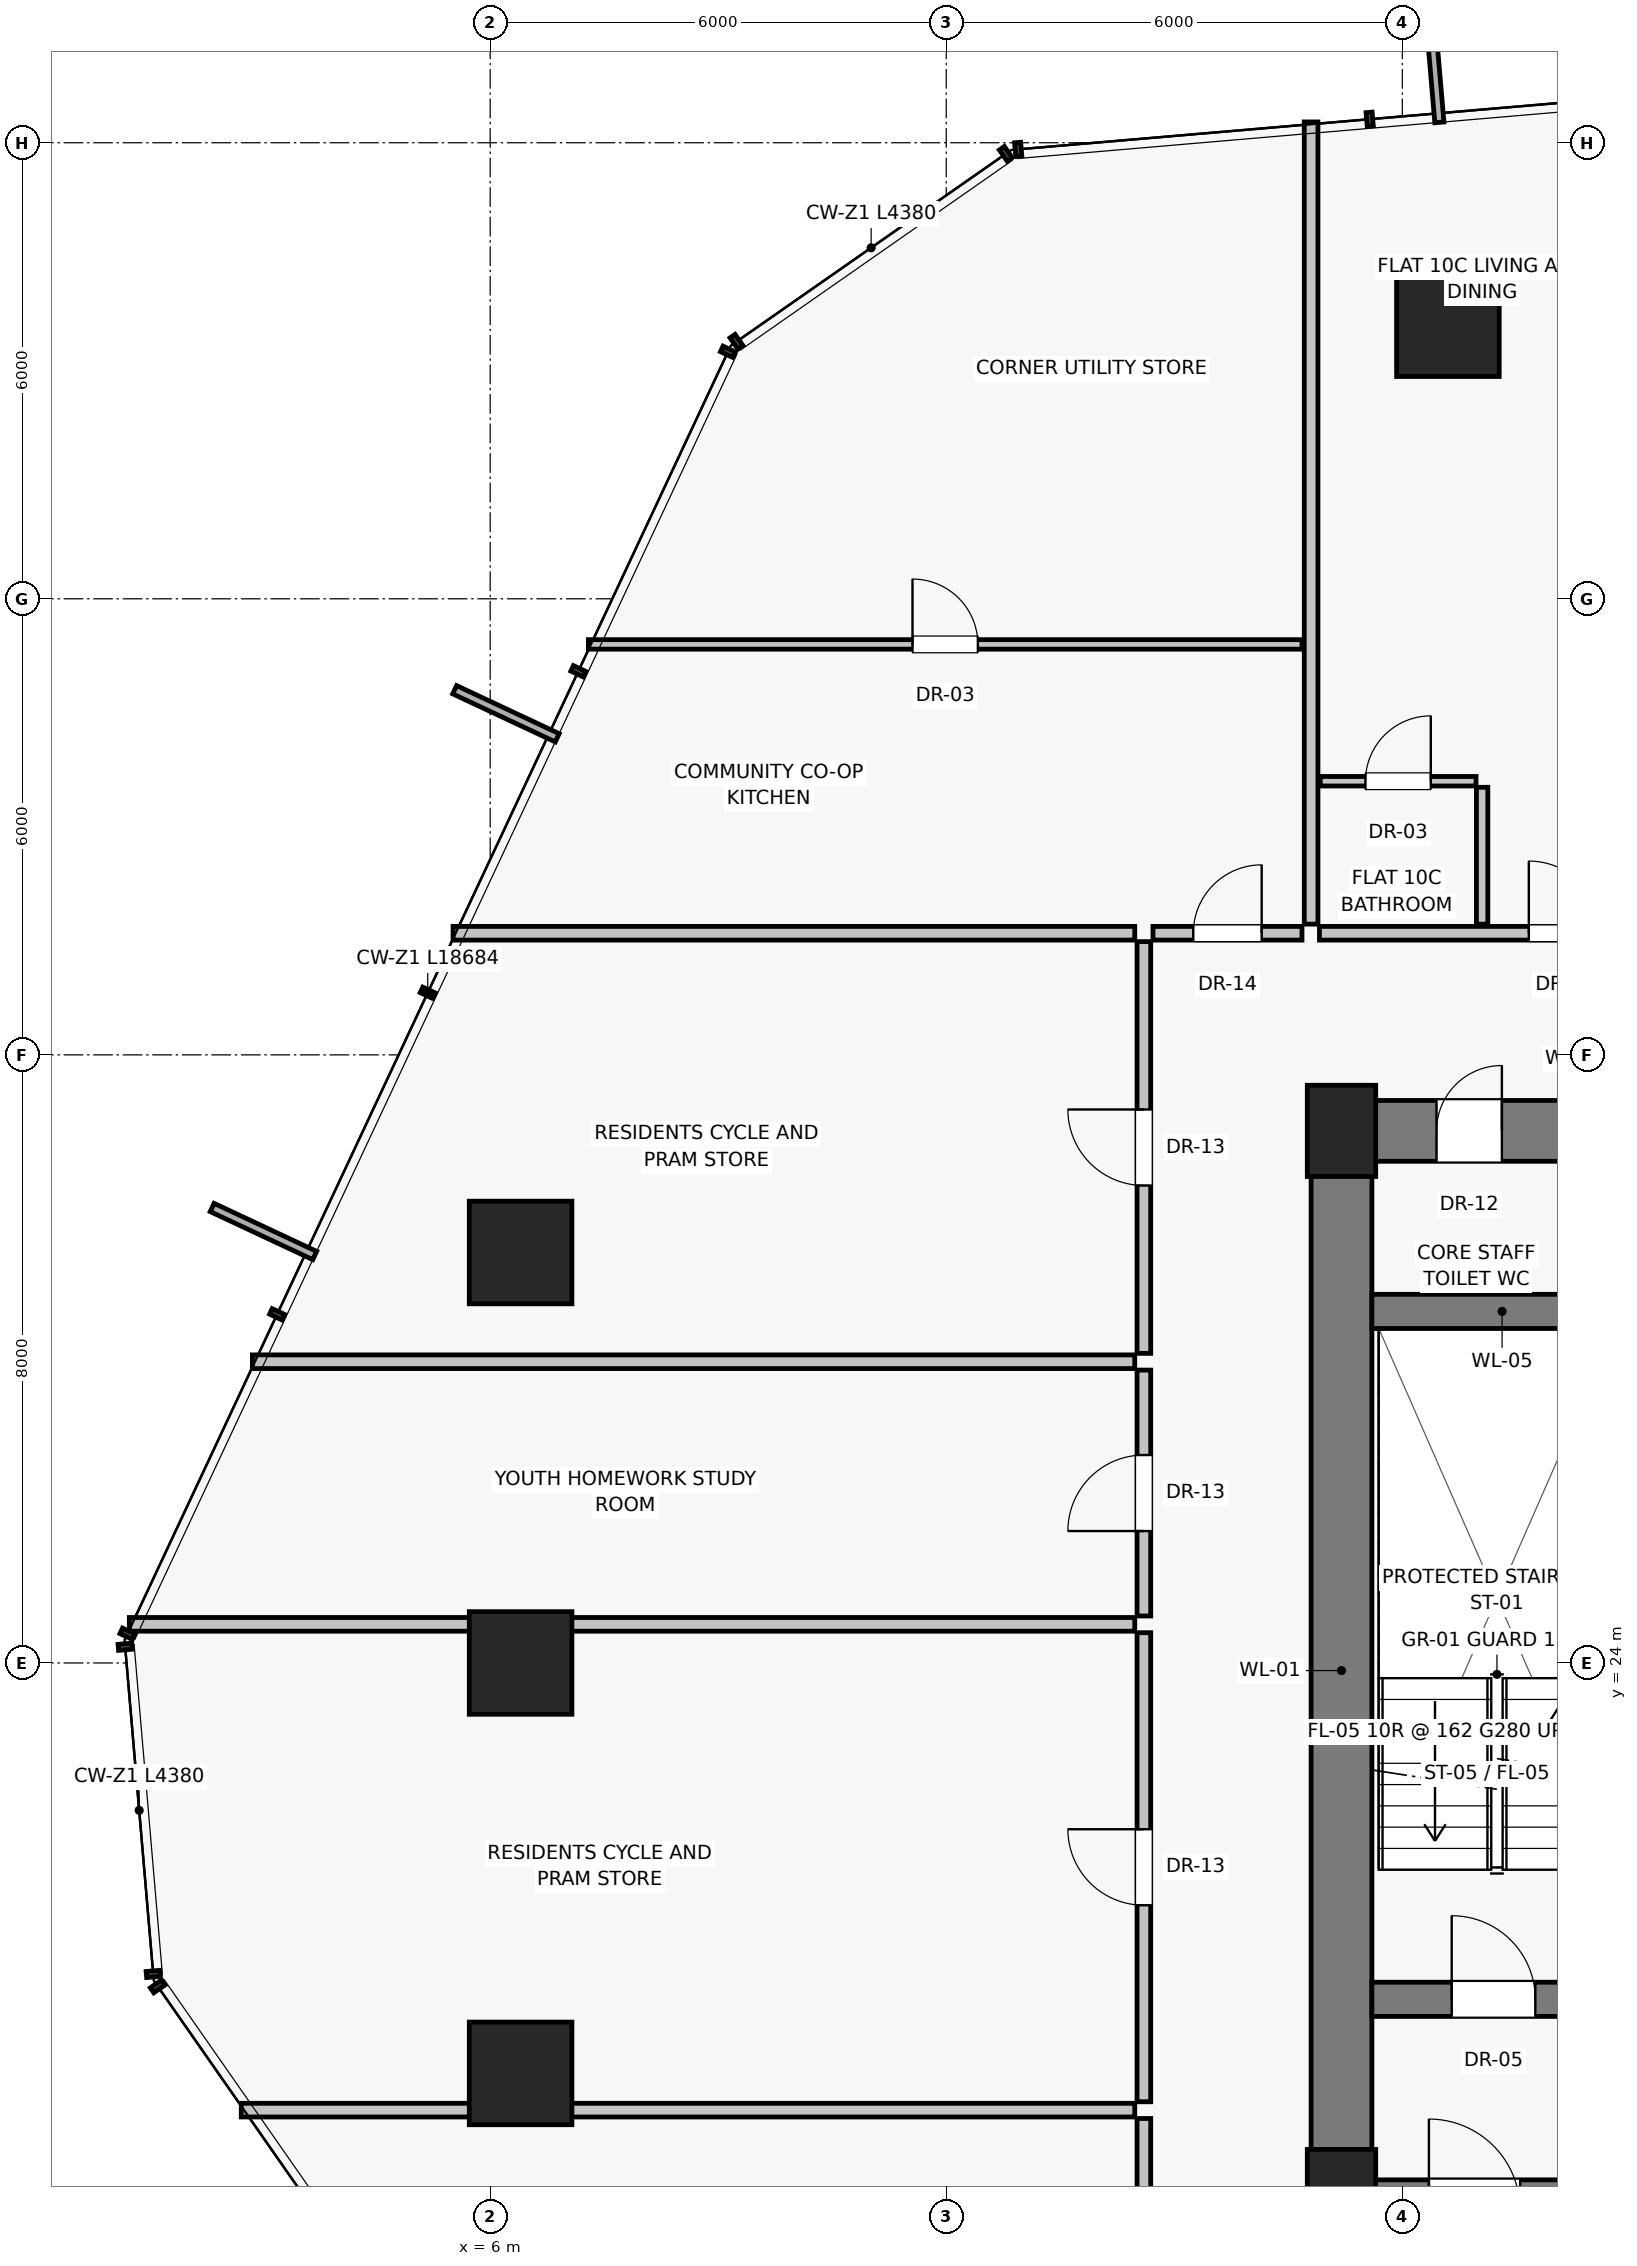
"""IFC4 building model, lengths in metres.
Left out: names, types, materials, properties, quantities, classifications, styles, units other than length and angle.
Written with IfcOpenShell. Run it as: python <this file> out.ifc"""

import sys

from ifc_helpers import new_model, si_unit, direction, frame, frame_2d, origin, origin_2d, place, context, subcontext, project, spatial, rectangle, extrude, source, transform, mapped, element, fill, save


model = new_model("IFC4")
c1 = context("Model", 3, precision=1e-05, world=origin(), true_north=direction((0.0, 1.0)))
c2 = subcontext(c1, "Body", "Model", "MODEL_VIEW")
j1 = project(units=[si_unit("LENGTHUNIT", "METRE"), si_unit("PLANEANGLEUNIT", "RADIAN")], contexts=[c1])
p1 = place(None, origin())
s1 = spatial("IfcSite", under=j1, at=p1, CompositionType="ELEMENT")
p2 = place(p1, origin())
s2 = spatial("IfcBuilding", under=s1, at=p2, CompositionType="ELEMENT")
p3 = place(p2, frame((0.0, 0.0, 40.3)))
s3 = spatial("IfcBuildingStorey", under=s2, at=p3, CompositionType="ELEMENT", Elevation=40.3)
for number, where, z_axis, x_axis in (
    (1, (17.2, 17.0, 0.0), (0.0, 0.0, 1.0), (1.0, 0.0, 0.0)),
    (2, (17.2, 31.0, 0.0), (0.0, 0.0, 1.0), (1.0, 0.0, 0.0)),
):
    element("IfcColumn", number, at=place(p3, frame(where, z_axis=z_axis, x_axis=x_axis)), inside=s3, PredefinedType="PILASTER", context=c2, shape_type="SweptSolid", body=[
        extrude(rectangle(XDim=0.9, YDim=1.2, at=origin_2d()), origin(), (0.0, 0.0, 1.0), 3.25),
    ])
for number, where, z_axis, x_axis in (
    (3, (18.6, 41.6, 0.0), (0.0, 0.0, 1.0), (1.0, 0.0, 0.0)),
    (4, (6.4, 29.4, 0.0), (0.0, 0.0, 1.0), (1.0, 0.0, 0.0)),
    (5, (6.4, 24.0, 0.0), (0.0, 0.0, 1.0), (1.0, 0.0, 0.0)),
    (6, (6.4, 18.6, 0.0), (0.0, 0.0, 1.0), (1.0, 0.0, 0.0)),
):
    element("IfcColumn", number, at=place(p3, frame(where, z_axis=z_axis, x_axis=x_axis)), inside=s3, PredefinedType="COLUMN", context=c2, shape_type="SweptSolid", body=[
        extrude(rectangle(XDim=1.35, YDim=1.35, at=origin_2d()), origin(), (0.0, 0.0, 1.0), 3.25),
    ])
p4 = place(p3, frame((17.2, 16.8, 0.0), z_axis=(0.0, 0.0, 1.0), x_axis=(0.0, 1.0, 0.0)))
e7 = element("IfcWall", 7, at=p4, inside=s3, PredefinedType="SHEAR", context=c2, shape_type="SweptSolid", body=[
    extrude(rectangle(XDim=14.2, YDim=0.8, at=frame_2d((7.1, 0.0))), origin(), (0.0, 0.0, 1.0), 3.0),
])
p5 = place(p3, frame((17.2, 16.8, 0.0), z_axis=(0.0, 0.0, 1.0), x_axis=(1.0, 0.0, 0.0)))
e8 = element("IfcWall", 8, at=p5, inside=s3, PredefinedType="SHEAR", context=c2, shape_type="SweptSolid", body=[
    extrude(rectangle(XDim=5.85, YDim=0.8, at=frame_2d((2.925, 0.0))), origin(), (0.0, 0.0, 1.0), 3.0),
])
p6 = place(p5, frame((1.15, 0.0, 0.0)))
e9 = element("IfcOpeningElement", 9, at=p6, cuts=e8, PredefinedType="OPENING", context=c2, shape_type="SweptSolid", body=[
    extrude(rectangle(XDim=1.2, YDim=2.03, at=frame_2d((0.6, 1.015))), frame((0.0, 0.41, 0.0), z_axis=(0.0, -1.0, 0.0), x_axis=(1.0, 0.0, 0.0)), (0.0, 0.0, 1.0), 0.82),
])
p7 = place(p3, frame((17.2, 31.0, 0.0), z_axis=(0.0, 0.0, 1.0), x_axis=(1.0, 0.0, 0.0)))
e10 = element("IfcWall", 10, at=p7, inside=s3, PredefinedType="SHEAR", context=c2, shape_type="SweptSolid", body=[
    extrude(rectangle(XDim=3.8, YDim=0.8, at=frame_2d((1.9, 0.0))), origin(), (0.0, 0.0, 1.0), 3.0),
])
p8 = place(p7, frame((1.25, 0.0, 0.0)))
e11 = element("IfcOpeningElement", 11, at=p8, cuts=e10, PredefinedType="OPENING", context=c2, shape_type="SweptSolid", body=[
    extrude(rectangle(XDim=0.86, YDim=2.01, at=frame_2d((0.43, 1.005))), frame((0.0, 0.41, 0.0), z_axis=(0.0, -1.0, 0.0), x_axis=(1.0, 0.0, 0.0)), (0.0, 0.0, 1.0), 0.82),
])
p9 = place(p3, frame((17.6, 19.575, 0.0), z_axis=(0.0, 0.0, 1.0), x_axis=(1.0, 0.0, 0.0)))
e12 = element("IfcWall", 12, at=p9, inside=s3, PredefinedType="SHEAR", context=c2, shape_type="SweptSolid", body=[
    extrude(rectangle(XDim=3.425, YDim=0.45, at=frame_2d((1.712, 0.0))), origin(), (0.0, 0.0, 1.0), 3.0),
])
p10 = place(p9, frame((1.05, 0.0, 0.0)))
e13 = element("IfcOpeningElement", 13, at=p10, cuts=e12, PredefinedType="OPENING", context=c2, shape_type="SweptSolid", body=[
    extrude(rectangle(XDim=1.1, YDim=2.03, at=frame_2d((0.55, 1.015))), frame((0.0, 0.235, 0.0), z_axis=(0.0, -1.0, 0.0), x_axis=(1.0, 0.0, 0.0)), (0.0, 0.0, 1.0), 0.47),
])
p11 = place(p3, frame((17.6, 28.625, 0.0), z_axis=(0.0, 0.0, 1.0), x_axis=(1.0, 0.0, 0.0)))
e14 = element("IfcWall", 14, at=p11, inside=s3, PredefinedType="SHEAR", context=c2, shape_type="SweptSolid", body=[
    extrude(rectangle(XDim=3.425, YDim=0.45, at=frame_2d((1.712, 0.0))), origin(), (0.0, 0.0, 1.0), 3.0),
])
p12 = place(p3, frame((16.8, 33.72, 0.0), z_axis=(0.0, 0.0, 1.0), x_axis=(0.0, 1.0, 0.0)))
e15 = element("IfcWall", 15, at=p12, inside=s3, PredefinedType="PARTITIONING", context=c2, shape_type="SweptSolid", body=[
    extrude(rectangle(XDim=10.554, YDim=0.18, at=frame_2d((5.277, 0.0))), origin(), (0.0, 0.0, 1.0), 3.0),
])
p13 = place(p3, frame((16.91, 33.6, 0.0), z_axis=(0.0, 0.0, 1.0), x_axis=(1.0, 0.0, 0.0)))
e16 = element("IfcWall", 16, at=p13, inside=s3, PredefinedType="PARTITIONING", context=c2, shape_type="SweptSolid", body=[
    extrude(rectangle(XDim=7.832, YDim=0.18, at=frame_2d((3.916, 0.0))), origin(), (0.0, 0.0, 1.0), 3.0),
])
p14 = place(p13, frame((2.754, 0.0, 0.0)))
e17 = element("IfcOpeningElement", 17, at=p14, cuts=e16, PredefinedType="OPENING", context=c2, shape_type="SweptSolid", body=[
    extrude(rectangle(XDim=0.95, YDim=2.02, at=frame_2d((0.475, 1.01))), frame((0.0, 0.1, 0.0), z_axis=(0.0, -1.0, 0.0), x_axis=(1.0, 0.0, 0.0)), (0.0, 0.0, 1.0), 0.2),
])
p15 = place(p3, frame((19.05, 33.72, 0.0), z_axis=(0.0, 0.0, 1.0), x_axis=(0.0, 1.0, 0.0)))
e18 = element("IfcWall", 18, at=p15, inside=s3, PredefinedType="PARTITIONING", context=c2, shape_type="SweptSolid", body=[
    extrude(rectangle(XDim=1.8, YDim=0.15, at=frame_2d((0.9, 0.0))), origin(), (0.0, 0.0, 1.0), 3.0),
])
p16 = place(p3, frame((16.92, 35.6, 0.0), z_axis=(0.0, 0.0, 1.0), x_axis=(1.0, 0.0, 0.0)))
e19 = element("IfcWall", 19, at=p16, inside=s3, PredefinedType="PARTITIONING", context=c2, shape_type="SweptSolid", body=[
    extrude(rectangle(XDim=2.05, YDim=0.125, at=frame_2d((1.025, 0.0))), origin(), (0.0, 0.0, 1.0), 3.0),
])
p17 = place(p16, frame((0.595, 0.0, 0.0)))
e20 = element("IfcOpeningElement", 20, at=p17, cuts=e19, PredefinedType="OPENING", context=c2, shape_type="SweptSolid", body=[
    extrude(rectangle(XDim=0.86, YDim=2.01, at=frame_2d((0.43, 1.005))), frame((0.0, 0.073, 0.0), z_axis=(0.0, -1.0, 0.0), x_axis=(1.0, 0.0, 0.0)), (0.0, 0.0, 1.0), 0.145),
])
p18 = place(p3, frame((14.48, 33.6, 0.0), z_axis=(0.0, 0.0, 1.0), x_axis=(-1.0, 0.0, 0.0)))
e21 = element("IfcWall", 21, at=p18, inside=s3, PredefinedType="PARTITIONING", context=c2, shape_type="SweptSolid", body=[
    extrude(rectangle(XDim=8.968, YDim=0.18, at=frame_2d((4.484, 0.0))), origin(), (0.0, 0.0, 1.0), 3.0),
])
p19 = place(p3, frame((14.6, 14.31, 0.0), z_axis=(0.0, 0.0, 1.0), x_axis=(0.0, 1.0, 0.0)))
e22 = element("IfcWall", 22, at=p19, inside=s3, PredefinedType="PARTITIONING", context=c2, shape_type="SweptSolid", body=[
    extrude(rectangle(XDim=3.697, YDim=0.18, at=frame_2d((1.849, 0.0))), origin(), (0.0, 0.0, 1.0), 3.0),
])
p20 = place(p19, frame((1.348, 0.0, 0.0)))
e23 = element("IfcOpeningElement", 23, at=p20, cuts=e22, PredefinedType="OPENING", context=c2, shape_type="SweptSolid", body=[
    extrude(rectangle(XDim=1.0, YDim=2.01, at=frame_2d((0.5, 1.005))), frame((0.0, 0.1, 0.0), z_axis=(0.0, -1.0, 0.0), x_axis=(1.0, 0.0, 0.0)), (0.0, 0.0, 1.0), 0.2),
])
p21 = place(p3, frame((14.6, 18.227, 0.0), z_axis=(0.0, 0.0, 1.0), x_axis=(0.0, 1.0, 0.0)))
e24 = element("IfcWall", 24, at=p21, inside=s3, PredefinedType="PARTITIONING", context=c2, shape_type="SweptSolid", body=[
    extrude(rectangle(XDim=6.171, YDim=0.18, at=frame_2d((3.085, 0.0))), origin(), (0.0, 0.0, 1.0), 3.0),
])
p22 = place(p21, frame((2.585, 0.0, 0.0)))
e25 = element("IfcOpeningElement", 25, at=p22, cuts=e24, PredefinedType="OPENING", context=c2, shape_type="SweptSolid", body=[
    extrude(rectangle(XDim=1.0, YDim=2.01, at=frame_2d((0.5, 1.005))), frame((0.0, 0.1, 0.0), z_axis=(0.0, -1.0, 0.0), x_axis=(1.0, 0.0, 0.0)), (0.0, 0.0, 1.0), 0.2),
])
p23 = place(p3, frame((14.48, 18.117, 0.0), z_axis=(0.0, 0.0, 1.0), x_axis=(-1.0, 0.0, 0.0)))
e26 = element("IfcWall", 26, at=p23, inside=s3, PredefinedType="PARTITIONING", context=c2, shape_type="SweptSolid", body=[
    extrude(rectangle(XDim=11.755, YDim=0.18, at=frame_2d((5.877, 0.0))), origin(), (0.0, 0.0, 1.0), 2.299),
])
p24 = place(p3, frame((14.48, 24.508, 0.0), z_axis=(0.0, 0.0, 1.0), x_axis=(-1.0, 0.0, 0.0)))
e27 = element("IfcWall", 27, at=p24, inside=s3, PredefinedType="PARTITIONING", context=c2, shape_type="SweptSolid", body=[
    extrude(rectangle(XDim=13.227, YDim=0.18, at=frame_2d((6.614, 0.0))), origin(), (0.0, 0.0, 1.0), 3.0),
])
p25 = place(p3, frame((14.6, 24.618, 0.0), z_axis=(0.0, 0.0, 1.0), x_axis=(0.0, 1.0, 0.0)))
e28 = element("IfcWall", 28, at=p25, inside=s3, PredefinedType="PARTITIONING", context=c2, shape_type="SweptSolid", body=[
    extrude(rectangle(XDim=3.235, YDim=0.18, at=frame_2d((1.618, 0.0))), origin(), (0.0, 0.0, 1.0), 3.0),
])
p26 = place(p25, frame((1.117, 0.0, 0.0)))
e29 = element("IfcOpeningElement", 29, at=p26, cuts=e28, PredefinedType="OPENING", context=c2, shape_type="SweptSolid", body=[
    extrude(rectangle(XDim=1.0, YDim=2.01, at=frame_2d((0.5, 1.005))), frame((0.0, 0.1, 0.0), z_axis=(0.0, -1.0, 0.0), x_axis=(1.0, 0.0, 0.0)), (0.0, 0.0, 1.0), 0.2),
])
p27 = place(p3, frame((14.6, 28.073, 0.0), z_axis=(0.0, 0.0, 1.0), x_axis=(0.0, 1.0, 0.0)))
e30 = element("IfcWall", 30, at=p27, inside=s3, PredefinedType="PARTITIONING", context=c2, shape_type="SweptSolid", body=[
    extrude(rectangle(XDim=5.417, YDim=0.18, at=frame_2d((2.708, 0.0))), origin(), (0.0, 0.0, 1.0), 3.0),
])
p28 = place(p27, frame((2.208, 0.0, 0.0)))
e31 = element("IfcOpeningElement", 31, at=p28, cuts=e30, PredefinedType="OPENING", context=c2, shape_type="SweptSolid", body=[
    extrude(rectangle(XDim=1.0, YDim=2.01, at=frame_2d((0.5, 1.005))), frame((0.0, 0.1, 0.0), z_axis=(0.0, -1.0, 0.0), x_axis=(1.0, 0.0, 0.0)), (0.0, 0.0, 1.0), 0.2),
])
p29 = place(p3, frame((14.48, 27.963, 0.0), z_axis=(0.0, 0.0, 1.0), x_axis=(-1.0, 0.0, 0.0)))
e32 = element("IfcWall", 32, at=p29, inside=s3, PredefinedType="PARTITIONING", context=c2, shape_type="SweptSolid", body=[
    extrude(rectangle(XDim=11.609, YDim=0.18, at=frame_2d((5.804, 0.0))), origin(), (0.0, 0.0, 1.0), 3.0),
])
p30 = place(p3, frame((14.72, 33.6, 0.0), z_axis=(0.0, 0.0, 1.0), x_axis=(1.0, 0.0, 0.0)))
e33 = element("IfcWall", 33, at=p30, inside=s3, PredefinedType="PARTITIONING", context=c2, shape_type="SweptSolid", body=[
    extrude(rectangle(XDim=1.96, YDim=0.18, at=frame_2d((0.98, 0.0))), origin(), (0.0, 0.0, 1.0), 3.0),
])
p31 = place(p30, frame((0.53, 0.0, 0.0)))
e34 = element("IfcOpeningElement", 34, at=p31, cuts=e33, PredefinedType="OPENING", context=c2, shape_type="SweptSolid", body=[
    extrude(rectangle(XDim=0.9, YDim=2.01, at=frame_2d((0.45, 1.005))), frame((0.0, 0.1, 0.0), z_axis=(0.0, -1.0, 0.0), x_axis=(1.0, 0.0, 0.0)), (0.0, 0.0, 1.0), 0.2),
])
p32 = place(p3, frame((7.292, 37.4, 0.0), z_axis=(0.0, 0.0, 1.0), x_axis=(1.0, 0.0, 0.0)))
e35 = element("IfcWall", 35, at=p32, inside=s3, PredefinedType="PARTITIONING", context=c2, shape_type="SweptSolid", body=[
    extrude(rectangle(XDim=9.388, YDim=0.125, at=frame_2d((4.694, 0.0))), origin(), (0.0, 0.0, 1.0), 3.0),
])
p33 = place(p32, frame((4.264, 0.0, 0.0)))
e36 = element("IfcOpeningElement", 36, at=p33, cuts=e35, PredefinedType="OPENING", context=c2, shape_type="SweptSolid", body=[
    extrude(rectangle(XDim=0.86, YDim=2.01, at=frame_2d((0.43, 1.005))), frame((0.0, 0.073, 0.0), z_axis=(0.0, -1.0, 0.0), x_axis=(1.0, 0.0, 0.0)), (0.0, 0.0, 1.0), 0.145),
])
m1 = source(origin(), c2, "Body", "SweptSolid", [
    extrude(rectangle(XDim=0.86, YDim=2.01, at=frame_2d((0.43, 1.005))), frame((0.0, 0.025, 0.0), z_axis=(0.0, -1.0, 0.0), x_axis=(1.0, 0.0, 0.0)), (0.0, 0.0, 1.0), 0.05),
])
p34 = place(p8, origin())
e37 = element("IfcDoor", 37, at=p34, inside=s3, OperationType="SINGLE_SWING_RIGHT", PredefinedType="DOOR", context=c2, shape_type="MappedRepresentation", body=[
    mapped(m1, transform((0.0, 0.0, 0.0), scale=1.0)),
])
fill(e11, e37)
m2 = source(origin(), c2, "Body", "SweptSolid", [
    extrude(rectangle(XDim=1.1, YDim=2.03, at=frame_2d((0.55, 1.015))), frame((0.0, 0.025, 0.0), z_axis=(0.0, -1.0, 0.0), x_axis=(1.0, 0.0, 0.0)), (0.0, 0.0, 1.0), 0.05),
])
p35 = place(p10, origin())
e38 = element("IfcDoor", 38, at=p35, inside=s3, OperationType="SINGLE_SWING_LEFT", PredefinedType="DOOR", context=c2, shape_type="MappedRepresentation", body=[
    mapped(m2, transform((0.0, 0.0, 0.0), scale=1.0)),
])
fill(e13, e38)
m3 = source(origin(), c2, "Body", "SweptSolid", [
    extrude(rectangle(XDim=0.95, YDim=2.02, at=frame_2d((0.475, 1.01))), frame((0.0, 0.025, 0.0), z_axis=(0.0, -1.0, 0.0), x_axis=(1.0, 0.0, 0.0)), (0.0, 0.0, 1.0), 0.05),
])
p36 = place(p14, origin())
e39 = element("IfcDoor", 39, at=p36, inside=s3, OperationType="SINGLE_SWING_LEFT", PredefinedType="DOOR", context=c2, shape_type="MappedRepresentation", body=[
    mapped(m3, transform((0.0, 0.0, 0.0), scale=1.0)),
])
fill(e17, e39)
p37 = place(p17, origin())
e40 = element("IfcDoor", 40, at=p37, inside=s3, OperationType="SINGLE_SWING_RIGHT", PredefinedType="DOOR", context=c2, shape_type="MappedRepresentation", body=[
    mapped(m1, transform((0.0, 0.0, 0.0), scale=1.0)),
])
fill(e20, e40)
m4 = source(origin(), c2, "Body", "SweptSolid", [
    extrude(rectangle(XDim=1.0, YDim=2.01, at=frame_2d((0.5, 1.005))), frame((0.0, 0.025, 0.0), z_axis=(0.0, -1.0, 0.0), x_axis=(1.0, 0.0, 0.0)), (0.0, 0.0, 1.0), 0.05),
])
p38 = place(p22, origin())
e41 = element("IfcDoor", 41, at=p38, inside=s3, OperationType="SINGLE_SWING_RIGHT", PredefinedType="DOOR", context=c2, shape_type="MappedRepresentation", body=[
    mapped(m4, transform((0.0, 0.0, 0.0), scale=1.0)),
])
fill(e25, e41)
p39 = place(p26, origin())
e42 = element("IfcDoor", 42, at=p39, inside=s3, OperationType="SINGLE_SWING_LEFT", PredefinedType="DOOR", context=c2, shape_type="MappedRepresentation", body=[
    mapped(m4, transform((0.0, 0.0, 0.0), scale=1.0)),
])
fill(e29, e42)
p40 = place(p28, origin())
e43 = element("IfcDoor", 43, at=p40, inside=s3, OperationType="SINGLE_SWING_RIGHT", PredefinedType="DOOR", context=c2, shape_type="MappedRepresentation", body=[
    mapped(m4, transform((0.0, 0.0, 0.0), scale=1.0)),
])
fill(e31, e43)
m5 = source(origin(), c2, "Body", "SweptSolid", [
    extrude(rectangle(XDim=0.9, YDim=2.01, at=frame_2d((0.45, 1.005))), frame((0.0, 0.025, 0.0), z_axis=(0.0, -1.0, 0.0), x_axis=(1.0, 0.0, 0.0)), (0.0, 0.0, 1.0), 0.05),
])
p41 = place(p31, origin())
e44 = element("IfcDoor", 44, at=p41, inside=s3, OperationType="SINGLE_SWING_RIGHT", PredefinedType="DOOR", context=c2, shape_type="MappedRepresentation", body=[
    mapped(m5, transform((0.0, 0.0, 0.0), scale=1.0)),
])
fill(e34, e44)
p42 = place(p33, origin())
e45 = element("IfcDoor", 45, at=p42, inside=s3, OperationType="SINGLE_SWING_LEFT", PredefinedType="DOOR", context=c2, shape_type="MappedRepresentation", body=[
    mapped(m1, transform((0.0, 0.0, 0.0), scale=1.0)),
])
fill(e36, e45)
save(model, sys.argv[1])
